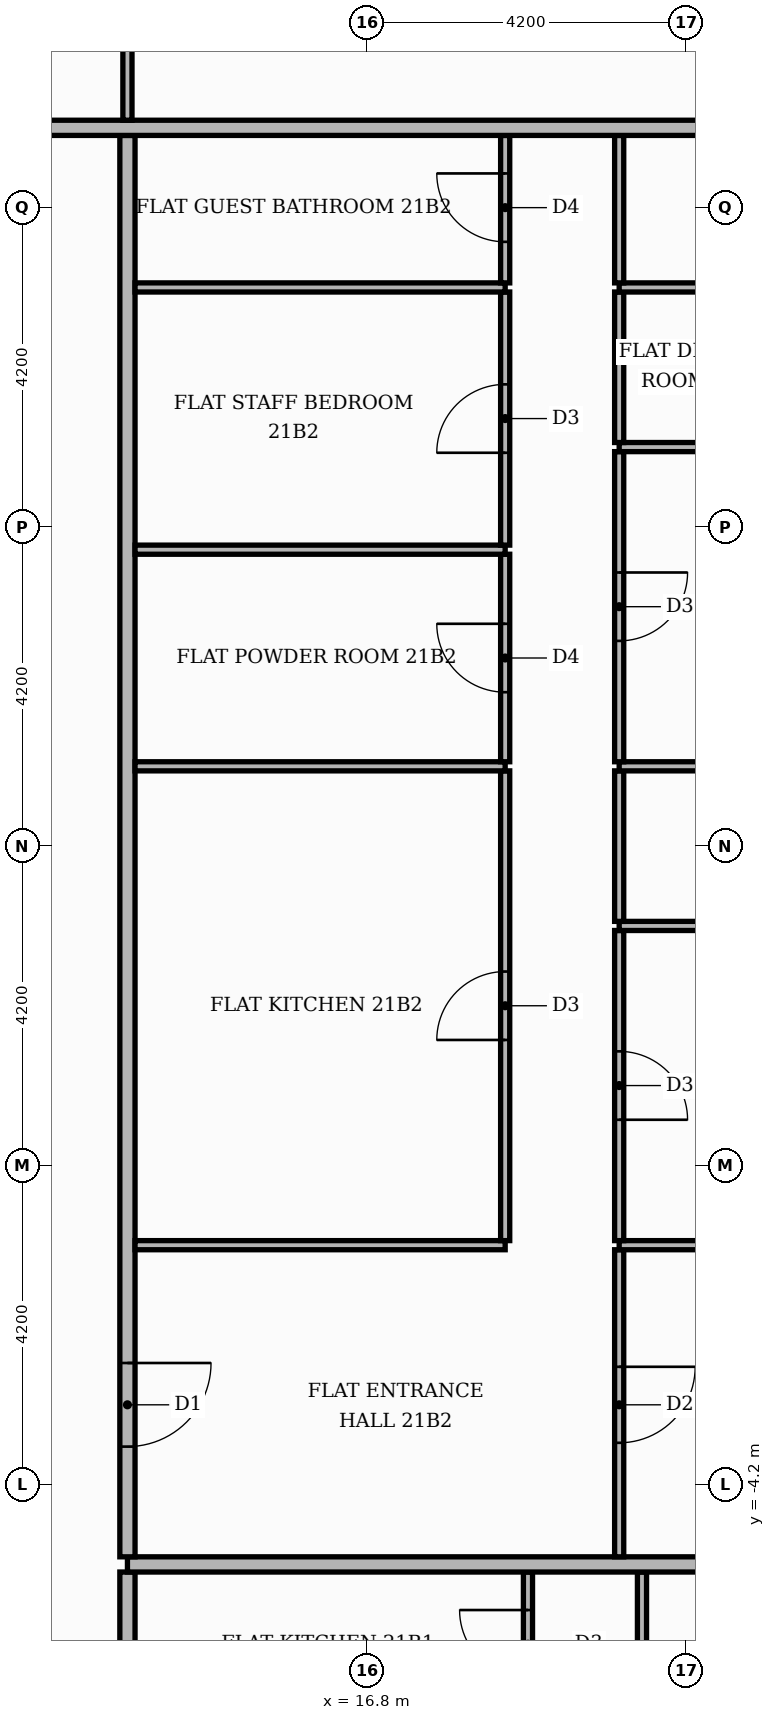
"""IFC4 building model, lengths in metres.
Left out: names, types, materials, properties, quantities, classifications, styles, units other than length and angle.
Written with IfcOpenShell. Run it as: python <this file> out.ifc"""

import sys

from ifc_helpers import new_model, si_unit, direction, frame, frame_2d, origin, place, context, subcontext, project, spatial, rectangle, extrude, element, fill, save


model = new_model("IFC4")
c1 = context("Model", 3, precision=1e-05, world=origin(), true_north=direction((0.0, 1.0)))
c2 = subcontext(c1, "Body", "Model", "MODEL_VIEW")
j1 = project(units=[si_unit("LENGTHUNIT", "METRE"), si_unit("PLANEANGLEUNIT", "RADIAN")], contexts=[c1])
p1 = place(None, origin())
s1 = spatial("IfcSite", under=j1, at=p1, CompositionType="ELEMENT")
p2 = place(p1, origin())
s2 = spatial("IfcBuilding", under=s1, at=p2, CompositionType="ELEMENT")
p3 = place(p2, frame((0.0, 0.0, 90.9)))
s3 = spatial("IfcBuildingStorey", under=s2, at=p3, CompositionType="ELEMENT", Elevation=90.9)
p4 = place(p3, frame((13.65, -13.55, 0.0), z_axis=(0.0, 0.0, 1.0), x_axis=(0.0, 1.0, 0.0)))
e1 = element("IfcWall", 1, at=p4, inside=s3, PredefinedType="PARTITIONING", context=c2, shape_type="SweptSolid", body=[
    extrude(rectangle(XDim=8.2, YDim=0.2, at=frame_2d((4.1, 0.0))), origin(), (0.0, 0.0, 1.0), 3.48),
])
p5 = place(p4, frame((1.45, 0.0, 0.0)))
e2 = element("IfcOpeningElement", 2, at=p5, cuts=e1, PredefinedType="OPENING", context=c2, shape_type="SweptSolid", body=[
    extrude(rectangle(XDim=1.1, YDim=2.4, at=frame_2d((0.55, 1.2))), frame((0.0, 0.11, 0.0), z_axis=(0.0, -1.0, 0.0), x_axis=(1.0, 0.0, 0.0)), (0.0, 0.0, 1.0), 0.22),
])
p6 = place(p3, frame((18.92, -7.29, 0.0), z_axis=(0.0, 0.0, 1.0), x_axis=(0.0, 1.0, 0.0)))
e3 = element("IfcWall", 3, at=p6, inside=s3, PredefinedType="PARTITIONING", context=c2, shape_type="SweptSolid", body=[
    extrude(rectangle(XDim=1.94, YDim=0.12, at=frame_2d((0.97, 0.0))), origin(), (0.0, 0.0, 1.0), 3.48),
])
p7 = place(p6, frame((0.54, 0.0, 0.0)))
e4 = element("IfcOpeningElement", 4, at=p7, cuts=e3, PredefinedType="OPENING", context=c2, shape_type="SweptSolid", body=[
    extrude(rectangle(XDim=0.9, YDim=2.1, at=frame_2d((0.45, 1.05))), frame((0.0, 0.07, 0.0), z_axis=(0.0, -1.0, 0.0), x_axis=(1.0, 0.0, 0.0)), (0.0, 0.0, 1.0), 0.14),
])
p8 = place(p3, frame((20.42, -7.29, 0.0), z_axis=(0.0, 0.0, 1.0), x_axis=(0.0, 1.0, 0.0)))
e5 = element("IfcWall", 5, at=p8, inside=s3, PredefinedType="PARTITIONING", context=c2, shape_type="SweptSolid", body=[
    extrude(rectangle(XDim=1.94, YDim=0.12, at=frame_2d((0.97, 0.0))), origin(), (0.0, 0.0, 1.0), 3.48),
])
p9 = place(p3, frame((13.65, -5.25, 0.0), z_axis=(0.0, 0.0, 1.0), x_axis=(1.0, 0.0, 0.0)))
e6 = element("IfcWall", 6, at=p9, inside=s3, PredefinedType="PARTITIONING", context=c2, shape_type="SweptSolid", body=[
    extrude(rectangle(XDim=11.77, YDim=0.2, at=frame_2d((5.885, 0.0))), origin(), (0.0, 0.0, 1.0), 3.48),
])
p10 = place(p3, frame((13.65, -5.15, 0.0), z_axis=(0.0, 0.0, 1.0), x_axis=(0.0, 1.0, 0.0)))
e7 = element("IfcWall", 7, at=p10, inside=s3, PredefinedType="PARTITIONING", context=c2, shape_type="SweptSolid", body=[
    extrude(rectangle(XDim=18.7, YDim=0.2, at=frame_2d((9.35, 0.0))), origin(), (0.0, 0.0, 1.0), 3.48),
])
p11 = place(p10, frame((1.45, 0.0, 0.0)))
e8 = element("IfcOpeningElement", 8, at=p11, cuts=e7, PredefinedType="OPENING", context=c2, shape_type="SweptSolid", body=[
    extrude(rectangle(XDim=1.1, YDim=2.4, at=frame_2d((0.55, 1.2))), frame((0.0, 0.11, 0.0), z_axis=(0.0, -1.0, 0.0), x_axis=(1.0, 0.0, 0.0)), (0.0, 0.0, 1.0), 0.22),
])
p12 = place(p3, frame((20.12, -5.15, 0.0), z_axis=(0.0, 0.0, 1.0), x_axis=(0.0, 1.0, 0.0)))
e9 = element("IfcWall", 9, at=p12, inside=s3, PredefinedType="PARTITIONING", context=c2, shape_type="SweptSolid", body=[
    extrude(rectangle(XDim=4.04, YDim=0.12, at=frame_2d((2.02, 0.0))), origin(), (0.0, 0.0, 1.0), 3.48),
])
p13 = place(p12, frame((1.5, 0.0, 0.0)))
e10 = element("IfcOpeningElement", 10, at=p13, cuts=e9, PredefinedType="OPENING", context=c2, shape_type="SweptSolid", body=[
    extrude(rectangle(XDim=1.0, YDim=2.1, at=frame_2d((0.5, 1.05))), frame((0.0, 0.07, 0.0), z_axis=(0.0, -1.0, 0.0), x_axis=(1.0, 0.0, 0.0)), (0.0, 0.0, 1.0), 0.14),
])
p14 = place(p3, frame((13.75, -1.05, 0.0), z_axis=(0.0, 0.0, 1.0), x_axis=(1.0, 0.0, 0.0)))
e11 = element("IfcWall", 11, at=p14, inside=s3, PredefinedType="PARTITIONING", context=c2, shape_type="SweptSolid", body=[
    extrude(rectangle(XDim=4.87, YDim=0.12, at=frame_2d((2.435, 0.0))), origin(), (0.0, 0.0, 1.0), 3.48),
])
p15 = place(p3, frame((20.12, -1.05, 0.0), z_axis=(0.0, 0.0, 1.0), x_axis=(1.0, 0.0, 0.0)))
e12 = element("IfcWall", 12, at=p15, inside=s3, PredefinedType="PARTITIONING", context=c2, shape_type="SweptSolid", body=[
    extrude(rectangle(XDim=5.3, YDim=0.12, at=frame_2d((2.65, 0.0))), origin(), (0.0, 0.0, 1.0), 3.48),
])
p16 = place(p3, frame((18.62, -0.99, 0.0), z_axis=(0.0, 0.0, 1.0), x_axis=(0.0, 1.0, 0.0)))
e13 = element("IfcWall", 13, at=p16, inside=s3, PredefinedType="PARTITIONING", context=c2, shape_type="SweptSolid", body=[
    extrude(rectangle(XDim=6.18, YDim=0.12, at=frame_2d((3.09, 0.0))), origin(), (0.0, 0.0, 1.0), 3.48),
])
p17 = place(p16, frame((2.64, 0.0, 0.0)))
e14 = element("IfcOpeningElement", 14, at=p17, cuts=e13, PredefinedType="OPENING", context=c2, shape_type="SweptSolid", body=[
    extrude(rectangle(XDim=0.9, YDim=2.1, at=frame_2d((0.45, 1.05))), frame((0.0, 0.07, 0.0), z_axis=(0.0, -1.0, 0.0), x_axis=(1.0, 0.0, 0.0)), (0.0, 0.0, 1.0), 0.14),
])
p18 = place(p3, frame((20.12, -0.99, 0.0), z_axis=(0.0, 0.0, 1.0), x_axis=(0.0, 1.0, 0.0)))
e15 = element("IfcWall", 15, at=p18, inside=s3, PredefinedType="PARTITIONING", context=c2, shape_type="SweptSolid", body=[
    extrude(rectangle(XDim=4.08, YDim=0.12, at=frame_2d((2.04, 0.0))), origin(), (0.0, 0.0, 1.0), 3.48),
])
p19 = place(p18, frame((1.59, 0.0, 0.0)))
e16 = element("IfcOpeningElement", 16, at=p19, cuts=e15, PredefinedType="OPENING", context=c2, shape_type="SweptSolid", body=[
    extrude(rectangle(XDim=0.9, YDim=2.1, at=frame_2d((0.45, 1.05))), frame((0.0, 0.07, 0.0), z_axis=(0.0, -1.0, 0.0), x_axis=(1.0, 0.0, 0.0)), (0.0, 0.0, 1.0), 0.14),
])
p20 = place(p3, frame((20.12, 3.15, 0.0), z_axis=(0.0, 0.0, 1.0), x_axis=(1.0, 0.0, 0.0)))
e17 = element("IfcWall", 17, at=p20, inside=s3, PredefinedType="PARTITIONING", context=c2, shape_type="SweptSolid", body=[
    extrude(rectangle(XDim=5.3, YDim=0.12, at=frame_2d((2.65, 0.0))), origin(), (0.0, 0.0, 1.0), 3.48),
])
p21 = place(p20, frame((2.35, 0.0, 0.0)))
e18 = element("IfcOpeningElement", 18, at=p21, cuts=e17, PredefinedType="OPENING", context=c2, shape_type="SweptSolid", body=[
    extrude(rectangle(XDim=0.9, YDim=2.1, at=frame_2d((0.45, 1.05))), frame((0.0, 0.07, 0.0), z_axis=(0.0, -1.0, 0.0), x_axis=(1.0, 0.0, 0.0)), (0.0, 0.0, 1.0), 0.14),
])
p22 = place(p3, frame((20.12, 3.21, 0.0), z_axis=(0.0, 0.0, 1.0), x_axis=(0.0, 1.0, 0.0)))
e19 = element("IfcWall", 19, at=p22, inside=s3, PredefinedType="PARTITIONING", context=c2, shape_type="SweptSolid", body=[
    extrude(rectangle(XDim=1.98, YDim=0.12, at=frame_2d((0.99, 0.0))), origin(), (0.0, 0.0, 1.0), 3.48),
])
p23 = place(p3, frame((13.75, 5.25, 0.0), z_axis=(0.0, 0.0, 1.0), x_axis=(1.0, 0.0, 0.0)))
e20 = element("IfcWall", 20, at=p23, inside=s3, PredefinedType="PARTITIONING", context=c2, shape_type="SweptSolid", body=[
    extrude(rectangle(XDim=4.87, YDim=0.12, at=frame_2d((2.435, 0.0))), origin(), (0.0, 0.0, 1.0), 3.48),
])
p24 = place(p3, frame((20.12, 5.25, 0.0), z_axis=(0.0, 0.0, 1.0), x_axis=(1.0, 0.0, 0.0)))
e21 = element("IfcWall", 21, at=p24, inside=s3, PredefinedType="PARTITIONING", context=c2, shape_type="SweptSolid", body=[
    extrude(rectangle(XDim=5.3, YDim=0.12, at=frame_2d((2.65, 0.0))), origin(), (0.0, 0.0, 1.0), 3.48),
])
p25 = place(p3, frame((18.62, 5.31, 0.0), z_axis=(0.0, 0.0, 1.0), x_axis=(0.0, 1.0, 0.0)))
e22 = element("IfcWall", 22, at=p25, inside=s3, PredefinedType="PARTITIONING", context=c2, shape_type="SweptSolid", body=[
    extrude(rectangle(XDim=2.73, YDim=0.12, at=frame_2d((1.365, 0.0))), origin(), (0.0, 0.0, 1.0), 3.48),
])
p26 = place(p25, frame((0.915, 0.0, 0.0)))
e23 = element("IfcOpeningElement", 23, at=p26, cuts=e22, PredefinedType="OPENING", context=c2, shape_type="SweptSolid", body=[
    extrude(rectangle(XDim=0.9, YDim=2.1, at=frame_2d((0.45, 1.05))), frame((0.0, 0.07, 0.0), z_axis=(0.0, -1.0, 0.0), x_axis=(1.0, 0.0, 0.0)), (0.0, 0.0, 1.0), 0.14),
])
p27 = place(p3, frame((20.12, 5.31, 0.0), z_axis=(0.0, 0.0, 1.0), x_axis=(0.0, 1.0, 0.0)))
e24 = element("IfcWall", 24, at=p27, inside=s3, PredefinedType="PARTITIONING", context=c2, shape_type="SweptSolid", body=[
    extrude(rectangle(XDim=4.08, YDim=0.12, at=frame_2d((2.04, 0.0))), origin(), (0.0, 0.0, 1.0), 3.48),
])
p28 = place(p27, frame((1.59, 0.0, 0.0)))
e25 = element("IfcOpeningElement", 25, at=p28, cuts=e24, PredefinedType="OPENING", context=c2, shape_type="SweptSolid", body=[
    extrude(rectangle(XDim=0.9, YDim=2.1, at=frame_2d((0.45, 1.05))), frame((0.0, 0.07, 0.0), z_axis=(0.0, -1.0, 0.0), x_axis=(1.0, 0.0, 0.0)), (0.0, 0.0, 1.0), 0.14),
])
p29 = place(p3, frame((13.75, 8.1, 0.0), z_axis=(0.0, 0.0, 1.0), x_axis=(1.0, 0.0, 0.0)))
e26 = element("IfcWall", 26, at=p29, inside=s3, PredefinedType="PARTITIONING", context=c2, shape_type="SweptSolid", body=[
    extrude(rectangle(XDim=4.87, YDim=0.12, at=frame_2d((2.435, 0.0))), origin(), (0.0, 0.0, 1.0), 3.48),
])
p30 = place(p3, frame((18.62, 8.16, 0.0), z_axis=(0.0, 0.0, 1.0), x_axis=(0.0, 1.0, 0.0)))
e27 = element("IfcWall", 27, at=p30, inside=s3, PredefinedType="PARTITIONING", context=c2, shape_type="SweptSolid", body=[
    extrude(rectangle(XDim=3.33, YDim=0.12, at=frame_2d((1.665, 0.0))), origin(), (0.0, 0.0, 1.0), 3.48),
])
p31 = place(p30, frame((1.215, 0.0, 0.0)))
e28 = element("IfcOpeningElement", 28, at=p31, cuts=e27, PredefinedType="OPENING", context=c2, shape_type="SweptSolid", body=[
    extrude(rectangle(XDim=0.9, YDim=2.1, at=frame_2d((0.45, 1.05))), frame((0.0, 0.07, 0.0), z_axis=(0.0, -1.0, 0.0), x_axis=(1.0, 0.0, 0.0)), (0.0, 0.0, 1.0), 0.14),
])
p32 = place(p3, frame((20.12, 9.45, 0.0), z_axis=(0.0, 0.0, 1.0), x_axis=(1.0, 0.0, 0.0)))
e29 = element("IfcWall", 29, at=p32, inside=s3, PredefinedType="PARTITIONING", context=c2, shape_type="SweptSolid", body=[
    extrude(rectangle(XDim=5.3, YDim=0.12, at=frame_2d((2.65, 0.0))), origin(), (0.0, 0.0, 1.0), 3.48),
])
p33 = place(p32, frame((2.35, 0.0, 0.0)))
e30 = element("IfcOpeningElement", 30, at=p33, cuts=e29, PredefinedType="OPENING", context=c2, shape_type="SweptSolid", body=[
    extrude(rectangle(XDim=0.9, YDim=2.1, at=frame_2d((0.45, 1.05))), frame((0.0, 0.07, 0.0), z_axis=(0.0, -1.0, 0.0), x_axis=(1.0, 0.0, 0.0)), (0.0, 0.0, 1.0), 0.14),
])
p34 = place(p3, frame((20.12, 9.51, 0.0), z_axis=(0.0, 0.0, 1.0), x_axis=(0.0, 1.0, 0.0)))
e31 = element("IfcWall", 31, at=p34, inside=s3, PredefinedType="PARTITIONING", context=c2, shape_type="SweptSolid", body=[
    extrude(rectangle(XDim=1.98, YDim=0.12, at=frame_2d((0.99, 0.0))), origin(), (0.0, 0.0, 1.0), 3.48),
])
p35 = place(p3, frame((13.75, 11.55, 0.0), z_axis=(0.0, 0.0, 1.0), x_axis=(1.0, 0.0, 0.0)))
e32 = element("IfcWall", 32, at=p35, inside=s3, PredefinedType="PARTITIONING", context=c2, shape_type="SweptSolid", body=[
    extrude(rectangle(XDim=4.87, YDim=0.12, at=frame_2d((2.435, 0.0))), origin(), (0.0, 0.0, 1.0), 3.48),
])
p36 = place(p3, frame((20.12, 11.55, 0.0), z_axis=(0.0, 0.0, 1.0), x_axis=(1.0, 0.0, 0.0)))
e33 = element("IfcWall", 33, at=p36, inside=s3, PredefinedType="PARTITIONING", context=c2, shape_type="SweptSolid", body=[
    extrude(rectangle(XDim=5.3, YDim=0.12, at=frame_2d((2.65, 0.0))), origin(), (0.0, 0.0, 1.0), 3.48),
])
p37 = place(p36, frame((2.35, 0.0, 0.0)))
e34 = element("IfcOpeningElement", 34, at=p37, cuts=e33, PredefinedType="OPENING", context=c2, shape_type="SweptSolid", body=[
    extrude(rectangle(XDim=0.9, YDim=2.1, at=frame_2d((0.45, 1.05))), frame((0.0, 0.07, 0.0), z_axis=(0.0, -1.0, 0.0), x_axis=(1.0, 0.0, 0.0)), (0.0, 0.0, 1.0), 0.14),
])
p38 = place(p3, frame((18.62, 11.61, 0.0), z_axis=(0.0, 0.0, 1.0), x_axis=(0.0, 1.0, 0.0)))
e35 = element("IfcWall", 35, at=p38, inside=s3, PredefinedType="PARTITIONING", context=c2, shape_type="SweptSolid", body=[
    extrude(rectangle(XDim=1.94, YDim=0.12, at=frame_2d((0.97, 0.0))), origin(), (0.0, 0.0, 1.0), 3.48),
])
p39 = place(p38, frame((0.54, 0.0, 0.0)))
e36 = element("IfcOpeningElement", 36, at=p39, cuts=e35, PredefinedType="OPENING", context=c2, shape_type="SweptSolid", body=[
    extrude(rectangle(XDim=0.9, YDim=2.1, at=frame_2d((0.45, 1.05))), frame((0.0, 0.07, 0.0), z_axis=(0.0, -1.0, 0.0), x_axis=(1.0, 0.0, 0.0)), (0.0, 0.0, 1.0), 0.14),
])
p40 = place(p3, frame((20.12, 11.61, 0.0), z_axis=(0.0, 0.0, 1.0), x_axis=(0.0, 1.0, 0.0)))
e37 = element("IfcWall", 37, at=p40, inside=s3, PredefinedType="PARTITIONING", context=c2, shape_type="SweptSolid", body=[
    extrude(rectangle(XDim=1.94, YDim=0.12, at=frame_2d((0.97, 0.0))), origin(), (0.0, 0.0, 1.0), 3.48),
])
p41 = place(p3, frame((-13.65, 13.65, 0.0), z_axis=(0.0, 0.0, 1.0), x_axis=(1.0, 0.0, 0.0)))
e38 = element("IfcWall", 38, at=p41, inside=s3, PredefinedType="PARTITIONING", context=c2, shape_type="SweptSolid", body=[
    extrude(rectangle(XDim=39.07, YDim=0.2, at=frame_2d((19.535, 0.0))), origin(), (0.0, 0.0, 1.0), 3.48),
])
p42 = place(p41, frame((23.6, 0.0, 0.0)))
e39 = element("IfcOpeningElement", 39, at=p42, cuts=e38, PredefinedType="OPENING", context=c2, shape_type="SweptSolid", body=[
    extrude(rectangle(XDim=1.1, YDim=2.4, at=frame_2d((0.55, 1.2))), frame((0.0, 0.11, 0.0), z_axis=(0.0, -1.0, 0.0), x_axis=(1.0, 0.0, 0.0)), (0.0, 0.0, 1.0), 0.22),
])
p43 = place(p3, frame((13.65, 13.75, 0.0), z_axis=(0.0, 0.0, 1.0), x_axis=(0.0, 1.0, 0.0)))
e40 = element("IfcWall", 40, at=p43, inside=s3, PredefinedType="PARTITIONING", context=c2, shape_type="SweptSolid", body=[
    extrude(rectangle(XDim=6.01, YDim=0.12, at=frame_2d((3.005, 0.0))), origin(), (0.0, 0.0, 1.0), 3.48),
])
p44 = place(p43, frame((2.535, 0.0, 0.0)))
e41 = element("IfcOpeningElement", 41, at=p44, cuts=e40, PredefinedType="OPENING", context=c2, shape_type="SweptSolid", body=[
    extrude(rectangle(XDim=0.9, YDim=2.1, at=frame_2d((0.45, 1.05))), frame((0.0, 0.07, 0.0), z_axis=(0.0, -1.0, 0.0), x_axis=(1.0, 0.0, 0.0)), (0.0, 0.0, 1.0), 0.14),
])
p45 = place(p7, origin())
e42 = element("IfcDoor", 42, at=p45, inside=s3, OperationType="SINGLE_SWING_RIGHT", PredefinedType="DOOR", context=c2, shape_type="SweptSolid", body=[
    extrude(rectangle(XDim=0.9, YDim=2.1, at=frame_2d((0.45, 1.05))), frame((0.0, 0.025, 0.0), z_axis=(0.0, -1.0, 0.0), x_axis=(1.0, 0.0, 0.0)), (0.0, 0.0, 1.0), 0.05),
])
fill(e4, e42)
p46 = place(p11, frame((1.1, 0.0, 0.0), z_axis=(0.0, 0.0, 1.0), x_axis=(-1.0, 0.0, 0.0)))
e43 = element("IfcDoor", 43, at=p46, inside=s3, OperationType="SINGLE_SWING_RIGHT", PredefinedType="DOOR", context=c2, shape_type="SweptSolid", body=[
    extrude(rectangle(XDim=1.1, YDim=2.4, at=frame_2d((0.55, 1.2))), frame((0.0, 0.025, 0.0), z_axis=(0.0, -1.0, 0.0), x_axis=(1.0, 0.0, 0.0)), (0.0, 0.0, 1.0), 0.05),
])
fill(e8, e43)
p47 = place(p17, origin())
e44 = element("IfcDoor", 44, at=p47, inside=s3, OperationType="SINGLE_SWING_LEFT", PredefinedType="DOOR", context=c2, shape_type="SweptSolid", body=[
    extrude(rectangle(XDim=0.9, YDim=2.1, at=frame_2d((0.45, 1.05))), frame((0.0, 0.025, 0.0), z_axis=(0.0, -1.0, 0.0), x_axis=(1.0, 0.0, 0.0)), (0.0, 0.0, 1.0), 0.05),
])
fill(e14, e44)
p48 = place(p26, origin())
e45 = element("IfcDoor", 45, at=p48, inside=s3, OperationType="SINGLE_SWING_RIGHT", PredefinedType="DOOR", context=c2, shape_type="SweptSolid", body=[
    extrude(rectangle(XDim=0.9, YDim=2.1, at=frame_2d((0.45, 1.05))), frame((0.0, 0.025, 0.0), z_axis=(0.0, -1.0, 0.0), x_axis=(1.0, 0.0, 0.0)), (0.0, 0.0, 1.0), 0.05),
])
fill(e23, e45)
p49 = place(p31, origin())
e46 = element("IfcDoor", 46, at=p49, inside=s3, OperationType="SINGLE_SWING_LEFT", PredefinedType="DOOR", context=c2, shape_type="SweptSolid", body=[
    extrude(rectangle(XDim=0.9, YDim=2.1, at=frame_2d((0.45, 1.05))), frame((0.0, 0.025, 0.0), z_axis=(0.0, -1.0, 0.0), x_axis=(1.0, 0.0, 0.0)), (0.0, 0.0, 1.0), 0.05),
])
fill(e28, e46)
p50 = place(p39, origin())
e47 = element("IfcDoor", 47, at=p50, inside=s3, OperationType="SINGLE_SWING_RIGHT", PredefinedType="DOOR", context=c2, shape_type="SweptSolid", body=[
    extrude(rectangle(XDim=0.9, YDim=2.1, at=frame_2d((0.45, 1.05))), frame((0.0, 0.025, 0.0), z_axis=(0.0, -1.0, 0.0), x_axis=(1.0, 0.0, 0.0)), (0.0, 0.0, 1.0), 0.05),
])
fill(e36, e47)
p51 = place(p13, frame((1.0, 0.0, 0.0), z_axis=(0.0, 0.0, 1.0), x_axis=(-1.0, 0.0, 0.0)))
e48 = element("IfcDoor", 48, at=p51, inside=s3, OperationType="SINGLE_SWING_RIGHT", PredefinedType="DOOR", context=c2, shape_type="SweptSolid", body=[
    extrude(rectangle(XDim=1.0, YDim=2.1, at=frame_2d((0.5, 1.05))), frame((0.0, 0.025, 0.0), z_axis=(0.0, -1.0, 0.0), x_axis=(1.0, 0.0, 0.0)), (0.0, 0.0, 1.0), 0.05),
])
fill(e10, e48)
p52 = place(p19, frame((0.9, 0.0, 0.0), z_axis=(0.0, 0.0, 1.0), x_axis=(-1.0, 0.0, 0.0)))
e49 = element("IfcDoor", 49, at=p52, inside=s3, OperationType="SINGLE_SWING_LEFT", PredefinedType="DOOR", context=c2, shape_type="SweptSolid", body=[
    extrude(rectangle(XDim=0.9, YDim=2.1, at=frame_2d((0.45, 1.05))), frame((0.0, 0.025, 0.0), z_axis=(0.0, -1.0, 0.0), x_axis=(1.0, 0.0, 0.0)), (0.0, 0.0, 1.0), 0.05),
])
fill(e16, e49)
p53 = place(p28, frame((0.9, 0.0, 0.0), z_axis=(0.0, 0.0, 1.0), x_axis=(-1.0, 0.0, 0.0)))
e50 = element("IfcDoor", 50, at=p53, inside=s3, OperationType="SINGLE_SWING_RIGHT", PredefinedType="DOOR", context=c2, shape_type="SweptSolid", body=[
    extrude(rectangle(XDim=0.9, YDim=2.1, at=frame_2d((0.45, 1.05))), frame((0.0, 0.025, 0.0), z_axis=(0.0, -1.0, 0.0), x_axis=(1.0, 0.0, 0.0)), (0.0, 0.0, 1.0), 0.05),
])
fill(e25, e50)
save(model, sys.argv[1])
